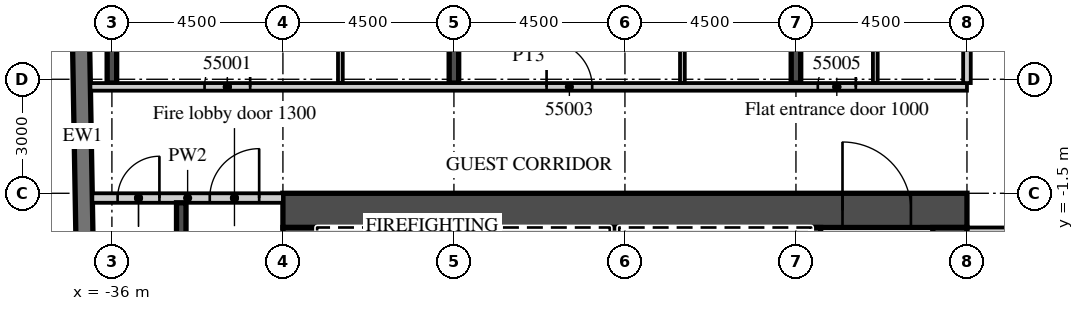
"""IFC4 building model, lengths in metres.
Left out: names, types, materials, properties, quantities, classifications, styles, units other than length and angle.
Written with IfcOpenShell. Run it as: python <this file> out.ifc"""

import sys

from ifc_helpers import new_model, si_unit, direction, frame, frame_2d, origin, place, context, subcontext, project, spatial, rectangle, extrude, element, fill, save


model = new_model("IFC4")
c1 = context("Model", 3, precision=1e-05, world=origin(), true_north=direction((0.0, 1.0)))
c2 = subcontext(c1, "Body", "Model", "MODEL_VIEW")
j1 = project(units=[si_unit("LENGTHUNIT", "METRE"), si_unit("PLANEANGLEUNIT", "RADIAN")], contexts=[c1])
p1 = place(None, origin())
s1 = spatial("IfcSite", under=j1, at=p1, CompositionType="ELEMENT")
p2 = place(p1, origin())
s2 = spatial("IfcBuilding", under=s1, at=p2, CompositionType="ELEMENT")
p3 = place(p2, frame((0.0, 0.0, 227.6)))
s3 = spatial("IfcBuildingStorey", under=s2, at=p3, CompositionType="ELEMENT", Elevation=227.6)
p4 = place(p3, frame((-36.0, 1.4, 0.0), z_axis=(0.0, 0.0, 1.0), x_axis=(0.0, 1.0, 0.0)))
e1 = element("IfcWall", 1, at=p4, inside=s3, PredefinedType="SHEAR", context=c2, shape_type="SweptSolid", body=[
    extrude(rectangle(XDim=17.125, YDim=0.25, at=frame_2d((8.563, 0.0))), origin(), (0.0, 0.0, 1.0), 3.3),
])
p5 = place(p3, frame((-27.0, 1.4, 0.0), z_axis=(0.0, 0.0, 1.0), x_axis=(0.0, 1.0, 0.0)))
e2 = element("IfcWall", 2, at=p5, inside=s3, PredefinedType="SHEAR", context=c2, shape_type="SweptSolid", body=[
    extrude(rectangle(XDim=18.817, YDim=0.25, at=frame_2d((9.409, 0.0))), origin(), (0.0, 0.0, 1.0), 3.3),
])
p6 = place(p3, frame((-18.0, 1.4, 0.0), z_axis=(0.0, 0.0, 1.0), x_axis=(0.0, 1.0, 0.0)))
e3 = element("IfcWall", 3, at=p6, inside=s3, PredefinedType="SHEAR", context=c2, shape_type="SweptSolid", body=[
    extrude(rectangle(XDim=18.974, YDim=0.25, at=frame_2d((9.487, 0.0))), origin(), (0.0, 0.0, 1.0), 3.3),
])
p7 = place(p3, frame((-37.057, 16.503, 0.0), z_axis=(0.0, 0.0, 1.0), x_axis=(0.017452279857, -0.999847697366, 0.0)))
e4 = element("IfcWall", 4, at=p7, inside=s3, PredefinedType="SOLIDWALL", context=c2, shape_type="SweptSolid", body=[
    extrude(rectangle(XDim=33.0, YDim=0.45, at=frame_2d((16.5, 0.0))), origin(), (0.0, 0.0, 1.0), 3.02),
])
p8 = place(p3, frame((-36.566, 1.3, 0.0), z_axis=(0.0, 0.0, 1.0), x_axis=(1.0, 0.0, 0.0)))
e5 = element("IfcWall", 5, at=p8, inside=s3, PredefinedType="PARTITIONING", context=c2, shape_type="SweptSolid", body=[
    extrude(rectangle(XDim=23.066, YDim=0.2, at=frame_2d((11.533, 0.0))), origin(), (0.0, 0.0, 1.0), 3.02),
])
p9 = place(p8, frame((3.004, 0.0, 0.0)))
e6 = element("IfcOpeningElement", 6, at=p9, cuts=e5, PredefinedType="OPENING", context=c2, shape_type="SweptSolid", body=[
    extrude(rectangle(XDim=1.2, YDim=2.1, at=frame_2d((0.6, 1.05))), frame((0.0, 0.11, 0.0), z_axis=(0.0, -1.0, 0.0), x_axis=(1.0, 0.0, 0.0)), (0.0, 0.0, 1.0), 0.22),
])
p10 = place(p8, frame((12.004, 0.0, 0.0)))
e7 = element("IfcOpeningElement", 7, at=p10, cuts=e5, PredefinedType="OPENING", context=c2, shape_type="SweptSolid", body=[
    extrude(rectangle(XDim=1.2, YDim=2.1, at=frame_2d((0.6, 1.05))), frame((0.0, 0.11, 0.0), z_axis=(0.0, -1.0, 0.0), x_axis=(1.0, 0.0, 0.0)), (0.0, 0.0, 1.0), 0.22),
])
p11 = place(p8, frame((19.141, 0.0, 0.0)))
e8 = element("IfcOpeningElement", 8, at=p11, cuts=e5, PredefinedType="OPENING", context=c2, shape_type="SweptSolid", body=[
    extrude(rectangle(XDim=1.0, YDim=2.1, at=frame_2d((0.5, 1.05))), frame((0.0, 0.11, 0.0), z_axis=(0.0, -1.0, 0.0), x_axis=(1.0, 0.0, 0.0)), (0.0, 0.0, 1.0), 0.22),
])
p12 = place(p3, frame((-29.988, 1.4, 0.0), z_axis=(0.0, 0.0, 1.0), x_axis=(0.0, 1.0, 0.0)))
e9 = element("IfcWall", 9, at=p12, inside=s3, PredefinedType="PARTITIONING", context=c2, shape_type="SweptSolid", body=[
    extrude(rectangle(XDim=5.725, YDim=0.125, at=frame_2d((2.863, 0.0))), origin(), (0.0, 0.0, 1.0), 3.02),
])
p13 = place(p12, frame((2.45, 0.0, 0.0)))
e10 = element("IfcOpeningElement", 10, at=p13, cuts=e9, PredefinedType="OPENING", context=c2, shape_type="SweptSolid", body=[
    extrude(rectangle(XDim=0.9, YDim=2.1, at=frame_2d((0.45, 1.05))), frame((0.0, 0.073, 0.0), z_axis=(0.0, -1.0, 0.0), x_axis=(1.0, 0.0, 0.0)), (0.0, 0.0, 1.0), 0.145),
])
p14 = place(p3, frame((-20.988, 1.4, 0.0), z_axis=(0.0, 0.0, 1.0), x_axis=(0.0, 1.0, 0.0)))
e11 = element("IfcWall", 11, at=p14, inside=s3, PredefinedType="PARTITIONING", context=c2, shape_type="SweptSolid", body=[
    extrude(rectangle(XDim=5.725, YDim=0.125, at=frame_2d((2.863, 0.0))), origin(), (0.0, 0.0, 1.0), 3.02),
])
p15 = place(p14, frame((2.45, 0.0, 0.0)))
e12 = element("IfcOpeningElement", 12, at=p15, cuts=e11, PredefinedType="OPENING", context=c2, shape_type="SweptSolid", body=[
    extrude(rectangle(XDim=0.9, YDim=2.1, at=frame_2d((0.45, 1.05))), frame((0.0, 0.073, 0.0), z_axis=(0.0, -1.0, 0.0), x_axis=(1.0, 0.0, 0.0)), (0.0, 0.0, 1.0), 0.145),
])
p16 = place(p3, frame((-13.5, 1.4, 0.0), z_axis=(0.0, 0.0, 1.0), x_axis=(0.0, 1.0, 0.0)))
e13 = element("IfcWall", 13, at=p16, inside=s3, PredefinedType="PARTITIONING", context=c2, shape_type="SweptSolid", body=[
    extrude(rectangle(XDim=19.065, YDim=0.2, at=frame_2d((9.533, 0.0))), origin(), (0.0, 0.0, 1.0), 3.02),
])
p17 = place(p3, frame((-15.912, 1.4, 0.0), z_axis=(0.0, 0.0, 1.0), x_axis=(0.0, 1.0, 0.0)))
e14 = element("IfcWall", 14, at=p17, inside=s3, PredefinedType="PARTITIONING", context=c2, shape_type="SweptSolid", body=[
    extrude(rectangle(XDim=5.725, YDim=0.125, at=frame_2d((2.863, 0.0))), origin(), (0.0, 0.0, 1.0), 3.02),
])
p18 = place(p17, frame((2.45, 0.0, 0.0)))
e15 = element("IfcOpeningElement", 15, at=p18, cuts=e14, PredefinedType="OPENING", context=c2, shape_type="SweptSolid", body=[
    extrude(rectangle(XDim=0.9, YDim=2.1, at=frame_2d((0.45, 1.05))), frame((0.0, 0.073, 0.0), z_axis=(0.0, -1.0, 0.0), x_axis=(1.0, 0.0, 0.0)), (0.0, 0.0, 1.0), 0.145),
])
p19 = place(p3, frame((-13.5, -2.5, 0.0), z_axis=(0.0, 0.0, 1.0), x_axis=(1.0, 0.0, 0.0)))
e16 = element("IfcWall", 16, at=p19, inside=s3, PredefinedType="PARTITIONING", context=c2, shape_type="SweptSolid", body=[
    extrude(rectangle(XDim=27.0, YDim=0.2, at=frame_2d((13.5, 0.0))), origin(), (0.0, 0.0, 1.0), 3.02),
])
p20 = place(p19, frame((2.925, 0.0, 0.0)))
e17 = element("IfcOpeningElement", 17, at=p20, cuts=e16, PredefinedType="OPENING", context=c2, shape_type="SweptSolid", body=[
    extrude(rectangle(XDim=1.0, YDim=2.1, at=frame_2d((0.5, 1.05))), frame((0.0, 0.11, 0.0), z_axis=(0.0, -1.0, 0.0), x_axis=(1.0, 0.0, 0.0)), (0.0, 0.0, 1.0), 0.22),
])
p21 = place(p19, frame((9.863, 0.0, 0.0)))
e18 = element("IfcOpeningElement", 18, at=p21, cuts=e16, PredefinedType="OPENING", context=c2, shape_type="SweptSolid", body=[
    extrude(rectangle(XDim=1.2, YDim=2.1, at=frame_2d((0.6, 1.05))), frame((0.0, 0.11, 0.0), z_axis=(0.0, -1.0, 0.0), x_axis=(1.0, 0.0, 0.0)), (0.0, 0.0, 1.0), 0.22),
])
p22 = place(p19, frame((16.45, 0.0, 0.0)))
e19 = element("IfcOpeningElement", 19, at=p22, cuts=e16, PredefinedType="OPENING", context=c2, shape_type="SweptSolid", body=[
    extrude(rectangle(XDim=1.0, YDim=2.1, at=frame_2d((0.5, 1.05))), frame((0.0, 0.11, 0.0), z_axis=(0.0, -1.0, 0.0), x_axis=(1.0, 0.0, 0.0)), (0.0, 0.0, 1.0), 0.22),
])
p23 = place(p19, frame((20.925, 0.0, 0.0)))
e20 = element("IfcOpeningElement", 20, at=p23, cuts=e16, PredefinedType="OPENING", context=c2, shape_type="SweptSolid", body=[
    extrude(rectangle(XDim=1.0, YDim=2.1, at=frame_2d((0.5, 1.05))), frame((0.0, 0.11, 0.0), z_axis=(0.0, -1.0, 0.0), x_axis=(1.0, 0.0, 0.0)), (0.0, 0.0, 1.0), 0.22),
])
p24 = place(p19, frame((25.425, 0.0, 0.0)))
e21 = element("IfcOpeningElement", 21, at=p24, cuts=e16, PredefinedType="OPENING", context=c2, shape_type="SweptSolid", body=[
    extrude(rectangle(XDim=1.0, YDim=2.1, at=frame_2d((0.5, 1.05))), frame((0.0, 0.11, 0.0), z_axis=(0.0, -1.0, 0.0), x_axis=(1.0, 0.0, 0.0)), (0.0, 0.0, 1.0), 0.22),
])
p25 = place(p3, frame((-31.5, -1.95, 0.0), z_axis=(0.0, 0.0, 1.0), x_axis=(1.0, 0.0, 0.0)))
e22 = element("IfcWall", 22, at=p25, inside=s3, PredefinedType="SHEAR", context=c2, shape_type="SweptSolid", body=[
    extrude(rectangle(XDim=18.0, YDim=0.9, at=frame_2d((9.0, 0.0))), origin(), (0.0, 0.0, 1.0), 3.02),
])
p26 = place(p25, frame((14.725, 0.0, 0.0)))
e23 = element("IfcOpeningElement", 23, at=p26, cuts=e22, PredefinedType="OPENING", context=c2, shape_type="SweptSolid", body=[
    extrude(rectangle(XDim=1.8, YDim=2.1, at=frame_2d((0.9, 1.05))), frame((0.0, 0.46, 0.0), z_axis=(0.0, -1.0, 0.0), x_axis=(1.0, 0.0, 0.0)), (0.0, 0.0, 1.0), 0.92),
])
p27 = place(p3, frame((-31.05, -15.2, 0.0), z_axis=(0.0, 0.0, 1.0), x_axis=(0.0, 1.0, 0.0)))
e24 = element("IfcWall", 24, at=p27, inside=s3, PredefinedType="SHEAR", context=c2, shape_type="SweptSolid", body=[
    extrude(rectangle(XDim=12.8, YDim=0.9, at=frame_2d((6.4, 0.0))), origin(), (0.0, 0.0, 1.0), 3.02),
])
p28 = place(p27, frame((11.5, 0.0, 0.0)))
e25 = element("IfcOpeningElement", 25, at=p28, cuts=e24, PredefinedType="OPENING", context=c2, shape_type="SweptSolid", body=[
    extrude(rectangle(XDim=1.1, YDim=2.1, at=frame_2d((0.55, 1.05))), frame((0.0, 0.46, 0.0), z_axis=(0.0, -1.0, 0.0), x_axis=(1.0, 0.0, 0.0)), (0.0, 0.0, 1.0), 0.92),
])
p29 = place(p3, frame((-13.95, -14.6, 0.0), z_axis=(0.0, 0.0, 1.0), x_axis=(0.0, 1.0, 0.0)))
e26 = element("IfcWall", 26, at=p29, inside=s3, PredefinedType="SHEAR", context=c2, shape_type="SweptSolid", body=[
    extrude(rectangle(XDim=12.2, YDim=0.9, at=frame_2d((6.1, 0.0))), origin(), (0.0, 0.0, 1.0), 3.02),
])
p30 = place(p3, frame((-17.475, -5.55, 0.0), z_axis=(0.0, 0.0, 1.0), x_axis=(0.0, 1.0, 0.0)))
e27 = element("IfcWall", 27, at=p30, inside=s3, PredefinedType="SHEAR", context=c2, shape_type="SweptSolid", body=[
    extrude(rectangle(XDim=3.15, YDim=0.25, at=frame_2d((1.575, 0.0))), origin(), (0.0, 0.0, 1.0), 3.02),
])
for number, where, z_axis, x_axis in (
    (28, (-27.975, -5.3, 0.0), (0.0, 0.0, 1.0), (0.0, 1.0, 0.0)),
    (29, (-22.775, -5.3, 0.0), (0.0, 0.0, 1.0), (0.0, 1.0, 0.0)),
):
    element("IfcWall", number, at=place(p3, frame(where, z_axis=z_axis, x_axis=x_axis)), inside=s3, PredefinedType="SHEAR", context=c2, shape_type="SweptSolid", body=[
        extrude(rectangle(XDim=2.9, YDim=0.25, at=frame_2d((1.45, 0.0))), origin(), (0.0, 0.0, 1.0), 3.02),
    ])
p31 = place(p3, frame((-36.515, -1.625, 0.0), z_axis=(0.0, 0.0, 1.0), x_axis=(1.0, 0.0, 0.0)))
e30 = element("IfcWall", 30, at=p31, inside=s3, PredefinedType="PARTITIONING", context=c2, shape_type="SweptSolid", body=[
    extrude(rectangle(XDim=5.015, YDim=0.25, at=frame_2d((2.508, 0.0))), origin(), (0.0, 0.0, 1.0), 3.02),
])
p32 = place(p31, frame((3.09, 0.0, 0.0)))
e31 = element("IfcOpeningElement", 31, at=p32, cuts=e30, PredefinedType="OPENING", context=c2, shape_type="SweptSolid", body=[
    extrude(rectangle(XDim=1.3, YDim=2.1, at=frame_2d((0.65, 1.05))), frame((0.0, 0.135, 0.0), z_axis=(0.0, -1.0, 0.0), x_axis=(1.0, 0.0, 0.0)), (0.0, 0.0, 1.0), 0.27),
])
p33 = place(p31, frame((0.665, 0.0, 0.0)))
e32 = element("IfcOpeningElement", 32, at=p33, cuts=e30, PredefinedType="OPENING", context=c2, shape_type="SweptSolid", body=[
    extrude(rectangle(XDim=1.1, YDim=2.1, at=frame_2d((0.55, 1.05))), frame((0.0, 0.135, 0.0), z_axis=(0.0, -1.0, 0.0), x_axis=(1.0, 0.0, 0.0)), (0.0, 0.0, 1.0), 0.27),
])
p34 = place(p3, frame((-34.175, -10.1, 0.0), z_axis=(0.0, 0.0, 1.0), x_axis=(0.0, 1.0, 0.0)))
e33 = element("IfcWall", 33, at=p34, inside=s3, PredefinedType="SHEAR", context=c2, shape_type="SweptSolid", body=[
    extrude(rectangle(XDim=8.35, YDim=0.25, at=frame_2d((4.175, 0.0))), origin(), (0.0, 0.0, 1.0), 3.02),
])
p35 = place(p9, origin())
e34 = element("IfcDoor", 34, at=p35, inside=s3, OperationType="SINGLE_SWING_RIGHT", PredefinedType="DOOR", context=c2, shape_type="SweptSolid", body=[
    extrude(rectangle(XDim=1.2, YDim=2.1, at=frame_2d((0.6, 1.05))), frame((0.0, 0.025, 0.0), z_axis=(0.0, -1.0, 0.0), x_axis=(1.0, 0.0, 0.0)), (0.0, 0.0, 1.0), 0.05),
])
fill(e6, e34)
p36 = place(p10, origin())
e35 = element("IfcDoor", 35, at=p36, inside=s3, OperationType="SINGLE_SWING_LEFT", PredefinedType="DOOR", context=c2, shape_type="SweptSolid", body=[
    extrude(rectangle(XDim=1.2, YDim=2.1, at=frame_2d((0.6, 1.05))), frame((0.0, 0.025, 0.0), z_axis=(0.0, -1.0, 0.0), x_axis=(1.0, 0.0, 0.0)), (0.0, 0.0, 1.0), 0.05),
])
fill(e7, e35)
p37 = place(p11, origin())
e36 = element("IfcDoor", 36, at=p37, inside=s3, OperationType="SINGLE_SWING_RIGHT", PredefinedType="DOOR", context=c2, shape_type="SweptSolid", body=[
    extrude(rectangle(XDim=1.0, YDim=2.1, at=frame_2d((0.5, 1.05))), frame((0.0, 0.025, 0.0), z_axis=(0.0, -1.0, 0.0), x_axis=(1.0, 0.0, 0.0)), (0.0, 0.0, 1.0), 0.05),
])
fill(e8, e36)
p38 = place(p26, origin())
e37 = element("IfcDoor", 37, at=p38, inside=s3, OperationType="DOUBLE_DOOR_DOUBLE_SWING", PredefinedType="DOOR", context=c2, shape_type="SweptSolid", body=[
    extrude(rectangle(XDim=1.8, YDim=2.1, at=frame_2d((0.9, 1.05))), frame((0.0, 0.025, 0.0), z_axis=(0.0, -1.0, 0.0), x_axis=(1.0, 0.0, 0.0)), (0.0, 0.0, 1.0), 0.05),
])
fill(e23, e37)
p39 = place(p32, origin())
e38 = element("IfcDoor", 38, at=p39, inside=s3, OperationType="SINGLE_SWING_RIGHT", PredefinedType="DOOR", context=c2, shape_type="SweptSolid", body=[
    extrude(rectangle(XDim=1.3, YDim=2.1, at=frame_2d((0.65, 1.05))), frame((0.0, 0.025, 0.0), z_axis=(0.0, -1.0, 0.0), x_axis=(1.0, 0.0, 0.0)), (0.0, 0.0, 1.0), 0.05),
])
fill(e31, e38)
p40 = place(p33, origin())
e39 = element("IfcDoor", 39, at=p40, inside=s3, OperationType="SINGLE_SWING_RIGHT", PredefinedType="DOOR", context=c2, shape_type="SweptSolid", body=[
    extrude(rectangle(XDim=1.1, YDim=2.1, at=frame_2d((0.55, 1.05))), frame((0.0, 0.025, 0.0), z_axis=(0.0, -1.0, 0.0), x_axis=(1.0, 0.0, 0.0)), (0.0, 0.0, 1.0), 0.05),
])
fill(e32, e39)
save(model, sys.argv[1])
